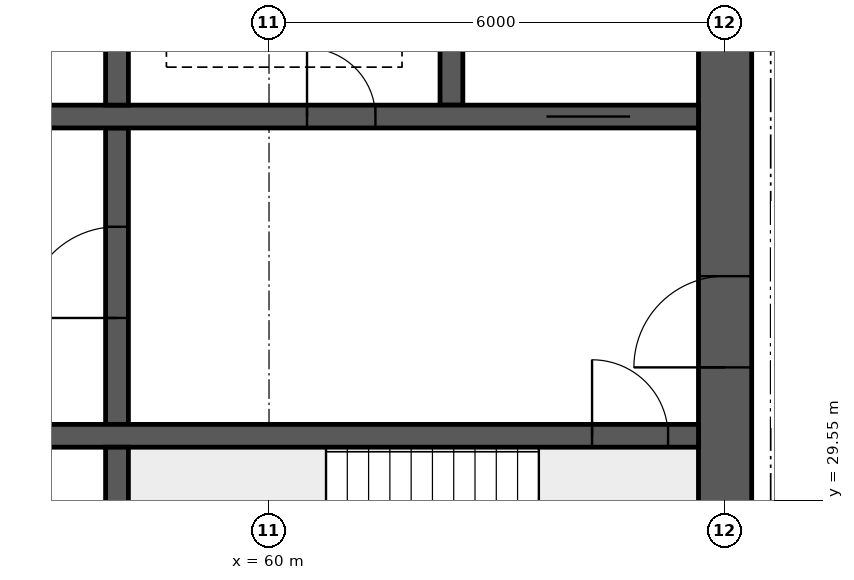
"""IFC4 building model, lengths in metres.
Left out: names, types, materials, properties, quantities, classifications, styles, units other than length and angle.
Written with IfcOpenShell. Run it as: python <this file> out.ifc"""

import sys

from ifc_helpers import new_model, si_unit, direction, frame, frame_2d, origin, place, context, subcontext, project, spatial, rectangle, extrude, element, fill, save


model = new_model("IFC4")
c1 = context("Model", 3, precision=1e-05, world=origin(), true_north=direction((0.0, 1.0)))
c2 = subcontext(c1, "Body", "Model", "MODEL_VIEW")
j1 = project(units=[si_unit("LENGTHUNIT", "METRE"), si_unit("PLANEANGLEUNIT", "RADIAN")], contexts=[c1])
p1 = place(None, origin())
s1 = spatial("IfcSite", under=j1, at=p1, CompositionType="ELEMENT")
p2 = place(p1, origin())
s2 = spatial("IfcBuilding", under=s1, at=p2, CompositionType="ELEMENT")
p3 = place(p2, frame((0.0, 0.0, 235.3)))
s3 = spatial("IfcBuildingStorey", under=s2, at=p3, CompositionType="ELEMENT", Elevation=235.3)
p4 = place(p3, frame((66.0, 26.15, 0.0), z_axis=(0.0, 0.0, 1.0), x_axis=(0.0, 1.0, 0.0)))
e1 = element("IfcWall", 1, at=p4, inside=s3, PredefinedType="SHEAR", context=c2, shape_type="SweptSolid", body=[
    extrude(rectangle(XDim=11.7, YDim=0.7, at=frame_2d((5.85, 0.0))), origin(), (0.0, 0.0, 1.0), 3.75),
])
p5 = place(p4, frame((5.15, 0.0, 0.0)))
e2 = element("IfcOpeningElement", 2, at=p5, cuts=e1, PredefinedType="OPENING", context=c2, shape_type="SweptSolid", body=[
    extrude(rectangle(XDim=1.2, YDim=2.1, at=frame_2d((0.6, 1.05))), frame((0.0, 0.36, 0.0), z_axis=(0.0, -1.0, 0.0), x_axis=(1.0, 0.0, 0.0)), (0.0, 0.0, 1.0), 0.72),
])
p6 = place(p3, frame((18.35, 30.4, 0.0), z_axis=(0.0, 0.0, 1.0), x_axis=(1.0, 0.0, 0.0)))
e3 = element("IfcWall", 3, at=p6, inside=s3, PredefinedType="SHEAR", context=c2, shape_type="SweptSolid", body=[
    extrude(rectangle(XDim=47.3, YDim=0.3, at=frame_2d((23.65, 0.0))), origin(), (0.0, 0.0, 1.0), 3.75),
])
p7 = place(p6, frame((0.4, 0.0, 0.0)))
e4 = element("IfcOpeningElement", 4, at=p7, cuts=e3, PredefinedType="OPENING", context=c2, shape_type="SweptSolid", body=[
    extrude(rectangle(XDim=1.0, YDim=2.1, at=frame_2d((0.5, 1.05))), frame((0.0, 0.16, 0.0), z_axis=(0.0, -1.0, 0.0), x_axis=(1.0, 0.0, 0.0)), (0.0, 0.0, 1.0), 0.32),
])
p8 = place(p6, frame((45.9, 0.0, 0.0)))
e5 = element("IfcOpeningElement", 5, at=p8, cuts=e3, PredefinedType="OPENING", context=c2, shape_type="SweptSolid", body=[
    extrude(rectangle(XDim=1.0, YDim=2.1, at=frame_2d((0.5, 1.05))), frame((0.0, 0.16, 0.0), z_axis=(0.0, -1.0, 0.0), x_axis=(1.0, 0.0, 0.0)), (0.0, 0.0, 1.0), 0.32),
])
p9 = place(p6, frame((8.4, 0.0, 0.0)))
e6 = element("IfcOpeningElement", 6, at=p9, cuts=e3, PredefinedType="OPENING", context=c2, shape_type="SweptSolid", body=[
    extrude(rectangle(XDim=1.1, YDim=2.1, at=frame_2d((0.55, 1.05))), frame((0.0, 0.16, 0.0), z_axis=(0.0, -1.0, 0.0), x_axis=(1.0, 0.0, 0.0)), (0.0, 0.0, 1.0), 0.32),
])
p10 = place(p6, frame((11.0, 0.0, 0.0)))
e7 = element("IfcOpeningElement", 7, at=p10, cuts=e3, PredefinedType="OPENING", context=c2, shape_type="SweptSolid", body=[
    extrude(rectangle(XDim=1.1, YDim=2.1, at=frame_2d((0.55, 1.05))), frame((0.0, 0.16, 0.0), z_axis=(0.0, -1.0, 0.0), x_axis=(1.0, 0.0, 0.0)), (0.0, 0.0, 1.0), 0.32),
])
p11 = place(p6, frame((13.6, 0.0, 0.0)))
e8 = element("IfcOpeningElement", 8, at=p11, cuts=e3, PredefinedType="OPENING", context=c2, shape_type="SweptSolid", body=[
    extrude(rectangle(XDim=1.1, YDim=2.1, at=frame_2d((0.55, 1.05))), frame((0.0, 0.16, 0.0), z_axis=(0.0, -1.0, 0.0), x_axis=(1.0, 0.0, 0.0)), (0.0, 0.0, 1.0), 0.32),
])
p12 = place(p6, frame((16.2, 0.0, 0.0)))
e9 = element("IfcOpeningElement", 9, at=p12, cuts=e3, PredefinedType="OPENING", context=c2, shape_type="SweptSolid", body=[
    extrude(rectangle(XDim=1.1, YDim=2.1, at=frame_2d((0.55, 1.05))), frame((0.0, 0.16, 0.0), z_axis=(0.0, -1.0, 0.0), x_axis=(1.0, 0.0, 0.0)), (0.0, 0.0, 1.0), 0.32),
])
p13 = place(p6, frame((18.975, 0.0, 0.0)))
e10 = element("IfcOpeningElement", 10, at=p13, cuts=e3, PredefinedType="OPENING", context=c2, shape_type="SweptSolid", body=[
    extrude(rectangle(XDim=0.9, YDim=2.1, at=frame_2d((0.45, 1.05))), frame((0.0, 0.16, 0.0), z_axis=(0.0, -1.0, 0.0), x_axis=(1.0, 0.0, 0.0)), (0.0, 0.0, 1.0), 0.32),
])
p14 = place(p6, frame((24.475, 0.0, 0.0)))
e11 = element("IfcOpeningElement", 11, at=p14, cuts=e3, PredefinedType="OPENING", context=c2, shape_type="SweptSolid", body=[
    extrude(rectangle(XDim=0.9, YDim=2.1, at=frame_2d((0.45, 1.05))), frame((0.0, 0.16, 0.0), z_axis=(0.0, -1.0, 0.0), x_axis=(1.0, 0.0, 0.0)), (0.0, 0.0, 1.0), 0.32),
])
p15 = place(p6, frame((30.267, 0.0, 0.0)))
e12 = element("IfcOpeningElement", 12, at=p15, cuts=e3, PredefinedType="OPENING", context=c2, shape_type="SweptSolid", body=[
    extrude(rectangle(XDim=1.1, YDim=2.1, at=frame_2d((0.55, 1.05))), frame((0.0, 0.16, 0.0), z_axis=(0.0, -1.0, 0.0), x_axis=(1.0, 0.0, 0.0)), (0.0, 0.0, 1.0), 0.32),
])
p16 = place(p6, frame((33.8, 0.0, 0.0)))
e13 = element("IfcOpeningElement", 13, at=p16, cuts=e3, PredefinedType="OPENING", context=c2, shape_type="SweptSolid", body=[
    extrude(rectangle(XDim=1.1, YDim=2.1, at=frame_2d((0.55, 1.05))), frame((0.0, 0.16, 0.0), z_axis=(0.0, -1.0, 0.0), x_axis=(1.0, 0.0, 0.0)), (0.0, 0.0, 1.0), 0.32),
])
p17 = place(p6, frame((37.333, 0.0, 0.0)))
e14 = element("IfcOpeningElement", 14, at=p17, cuts=e3, PredefinedType="OPENING", context=c2, shape_type="SweptSolid", body=[
    extrude(rectangle(XDim=1.1, YDim=2.1, at=frame_2d((0.55, 1.05))), frame((0.0, 0.16, 0.0), z_axis=(0.0, -1.0, 0.0), x_axis=(1.0, 0.0, 0.0)), (0.0, 0.0, 1.0), 0.32),
])
p18 = place(p3, frame((18.35, 34.6, 0.0), z_axis=(0.0, 0.0, 1.0), x_axis=(1.0, 0.0, 0.0)))
e15 = element("IfcWall", 15, at=p18, inside=s3, PredefinedType="SHEAR", context=c2, shape_type="SweptSolid", body=[
    extrude(rectangle(XDim=47.3, YDim=0.3, at=frame_2d((23.65, 0.0))), origin(), (0.0, 0.0, 1.0), 3.75),
])
p19 = place(p18, frame((0.9, 0.0, 0.0)))
e16 = element("IfcOpeningElement", 16, at=p19, cuts=e15, PredefinedType="OPENING", context=c2, shape_type="SweptSolid", body=[
    extrude(rectangle(XDim=1.1, YDim=2.1, at=frame_2d((0.55, 1.05))), frame((0.0, 0.16, 0.0), z_axis=(0.0, -1.0, 0.0), x_axis=(1.0, 0.0, 0.0)), (0.0, 0.0, 1.0), 0.32),
])
p20 = place(p18, frame((45.3, 0.0, 0.0)))
e17 = element("IfcOpeningElement", 17, at=p20, cuts=e15, PredefinedType="OPENING", context=c2, shape_type="SweptSolid", body=[
    extrude(rectangle(XDim=1.1, YDim=2.1, at=frame_2d((0.55, 1.05))), frame((0.0, 0.16, 0.0), z_axis=(0.0, -1.0, 0.0), x_axis=(1.0, 0.0, 0.0)), (0.0, 0.0, 1.0), 0.32),
])
p21 = place(p18, frame((4.25, 0.0, 0.0)))
e18 = element("IfcOpeningElement", 18, at=p21, cuts=e15, PredefinedType="OPENING", context=c2, shape_type="SweptSolid", body=[
    extrude(rectangle(XDim=0.9, YDim=2.1, at=frame_2d((0.45, 1.05))), frame((0.0, 0.16, 0.0), z_axis=(0.0, -1.0, 0.0), x_axis=(1.0, 0.0, 0.0)), (0.0, 0.0, 1.0), 0.32),
])
p22 = place(p18, frame((42.15, 0.0, 0.0)))
e19 = element("IfcOpeningElement", 19, at=p22, cuts=e15, PredefinedType="OPENING", context=c2, shape_type="SweptSolid", body=[
    extrude(rectangle(XDim=0.9, YDim=2.1, at=frame_2d((0.45, 1.05))), frame((0.0, 0.16, 0.0), z_axis=(0.0, -1.0, 0.0), x_axis=(1.0, 0.0, 0.0)), (0.0, 0.0, 1.0), 0.32),
])
p23 = place(p18, frame((9.025, 0.0, 0.0)))
e20 = element("IfcOpeningElement", 20, at=p23, cuts=e15, PredefinedType="OPENING", context=c2, shape_type="SweptSolid", body=[
    extrude(rectangle(XDim=0.9, YDim=2.1, at=frame_2d((0.45, 1.05))), frame((0.0, 0.16, 0.0), z_axis=(0.0, -1.0, 0.0), x_axis=(1.0, 0.0, 0.0)), (0.0, 0.0, 1.0), 0.32),
])
p24 = place(p18, frame((12.999, 0.0, 0.0)))
e21 = element("IfcOpeningElement", 21, at=p24, cuts=e15, PredefinedType="OPENING", context=c2, shape_type="SweptSolid", body=[
    extrude(rectangle(XDim=0.9, YDim=2.1, at=frame_2d((0.45, 1.05))), frame((0.0, 0.16, 0.0), z_axis=(0.0, -1.0, 0.0), x_axis=(1.0, 0.0, 0.0)), (0.0, 0.0, 1.0), 0.32),
])
p25 = place(p18, frame((16.646, 0.0, 0.0)))
e22 = element("IfcOpeningElement", 22, at=p25, cuts=e15, PredefinedType="OPENING", context=c2, shape_type="SweptSolid", body=[
    extrude(rectangle(XDim=0.9, YDim=2.1, at=frame_2d((0.45, 1.05))), frame((0.0, 0.16, 0.0), z_axis=(0.0, -1.0, 0.0), x_axis=(1.0, 0.0, 0.0)), (0.0, 0.0, 1.0), 0.32),
])
p26 = place(p18, frame((20.405, 0.0, 0.0)))
e23 = element("IfcOpeningElement", 23, at=p26, cuts=e15, PredefinedType="OPENING", context=c2, shape_type="SweptSolid", body=[
    extrude(rectangle(XDim=0.9, YDim=2.1, at=frame_2d((0.45, 1.05))), frame((0.0, 0.16, 0.0), z_axis=(0.0, -1.0, 0.0), x_axis=(1.0, 0.0, 0.0)), (0.0, 0.0, 1.0), 0.32),
])
p27 = place(p18, frame((24.811, 0.0, 0.0)))
e24 = element("IfcOpeningElement", 24, at=p27, cuts=e15, PredefinedType="OPENING", context=c2, shape_type="SweptSolid", body=[
    extrude(rectangle(XDim=0.9, YDim=2.1, at=frame_2d((0.45, 1.05))), frame((0.0, 0.16, 0.0), z_axis=(0.0, -1.0, 0.0), x_axis=(1.0, 0.0, 0.0)), (0.0, 0.0, 1.0), 0.32),
])
p28 = place(p18, frame((27.608, 0.0, 0.0)))
e25 = element("IfcOpeningElement", 25, at=p28, cuts=e15, PredefinedType="OPENING", context=c2, shape_type="SweptSolid", body=[
    extrude(rectangle(XDim=0.9, YDim=2.1, at=frame_2d((0.45, 1.05))), frame((0.0, 0.16, 0.0), z_axis=(0.0, -1.0, 0.0), x_axis=(1.0, 0.0, 0.0)), (0.0, 0.0, 1.0), 0.32),
])
p29 = place(p18, frame((30.791, 0.0, 0.0)))
e26 = element("IfcOpeningElement", 26, at=p29, cuts=e15, PredefinedType="OPENING", context=c2, shape_type="SweptSolid", body=[
    extrude(rectangle(XDim=0.9, YDim=2.1, at=frame_2d((0.45, 1.05))), frame((0.0, 0.16, 0.0), z_axis=(0.0, -1.0, 0.0), x_axis=(1.0, 0.0, 0.0)), (0.0, 0.0, 1.0), 0.32),
])
p30 = place(p18, frame((34.742, 0.0, 0.0)))
e27 = element("IfcOpeningElement", 27, at=p30, cuts=e15, PredefinedType="OPENING", context=c2, shape_type="SweptSolid", body=[
    extrude(rectangle(XDim=0.9, YDim=2.1, at=frame_2d((0.45, 1.05))), frame((0.0, 0.16, 0.0), z_axis=(0.0, -1.0, 0.0), x_axis=(1.0, 0.0, 0.0)), (0.0, 0.0, 1.0), 0.32),
])
p31 = place(p18, frame((37.68, 0.0, 0.0)))
e28 = element("IfcOpeningElement", 28, at=p31, cuts=e15, PredefinedType="OPENING", context=c2, shape_type="SweptSolid", body=[
    extrude(rectangle(XDim=0.9, YDim=2.1, at=frame_2d((0.45, 1.05))), frame((0.0, 0.16, 0.0), z_axis=(0.0, -1.0, 0.0), x_axis=(1.0, 0.0, 0.0)), (0.0, 0.0, 1.0), 0.32),
])
p32 = place(p3, frame((58.0, 26.15, 0.0), z_axis=(0.0, 0.0, 1.0), x_axis=(0.0, 1.0, 0.0)))
e29 = element("IfcWall", 29, at=p32, inside=s3, PredefinedType="SHEAR", context=c2, shape_type="SweptSolid", body=[
    extrude(rectangle(XDim=4.1, YDim=0.3, at=frame_2d((2.05, 0.0))), origin(), (0.0, 0.0, 1.0), 3.75),
])
p33 = place(p3, frame((58.0, 30.55, 0.0), z_axis=(0.0, 0.0, 1.0), x_axis=(0.0, 1.0, 0.0)))
e30 = element("IfcWall", 30, at=p33, inside=s3, PredefinedType="SHEAR", context=c2, shape_type="SweptSolid", body=[
    extrude(rectangle(XDim=3.9, YDim=0.3, at=frame_2d((1.95, 0.0))), origin(), (0.0, 0.0, 1.0), 3.75),
])
p34 = place(p33, frame((1.4, 0.0, 0.0)))
e31 = element("IfcOpeningElement", 31, at=p34, cuts=e30, PredefinedType="OPENING", context=c2, shape_type="SweptSolid", body=[
    extrude(rectangle(XDim=1.2, YDim=2.1, at=frame_2d((0.6, 1.05))), frame((0.0, 0.16, 0.0), z_axis=(0.0, -1.0, 0.0), x_axis=(1.0, 0.0, 0.0)), (0.0, 0.0, 1.0), 0.32),
])
for number, where, z_axis, x_axis in (
    (32, (62.4, 34.75, 0.0), (0.0, 0.0, 1.0), (0.0, 1.0, 0.0)),
    (33, (58.0, 34.75, 0.0), (0.0, 0.0, 1.0), (0.0, 1.0, 0.0)),
):
    element("IfcWall", number, at=place(p3, frame(where, z_axis=z_axis, x_axis=x_axis)), inside=s3, PredefinedType="SHEAR", context=c2, shape_type="SweptSolid", body=[
        extrude(rectangle(XDim=3.1, YDim=0.3, at=frame_2d((1.55, 0.0))), origin(), (0.0, 0.0, 1.0), 3.75),
    ])
p35 = place(p5, origin())
e34 = element("IfcDoor", 34, at=p35, inside=s3, OperationType="SINGLE_SWING_LEFT", PredefinedType="DOOR", context=c2, shape_type="SweptSolid", body=[
    extrude(rectangle(XDim=1.2, YDim=2.1, at=frame_2d((0.6, 1.05))), frame((0.0, 0.025, 0.0), z_axis=(0.0, -1.0, 0.0), x_axis=(1.0, 0.0, 0.0)), (0.0, 0.0, 1.0), 0.05),
])
fill(e2, e34)
p36 = place(p8, origin())
e35 = element("IfcDoor", 35, at=p36, inside=s3, OperationType="SINGLE_SWING_LEFT", PredefinedType="DOOR", context=c2, shape_type="SweptSolid", body=[
    extrude(rectangle(XDim=1.0, YDim=2.1, at=frame_2d((0.5, 1.05))), frame((0.0, 0.025, 0.0), z_axis=(0.0, -1.0, 0.0), x_axis=(1.0, 0.0, 0.0)), (0.0, 0.0, 1.0), 0.05),
])
fill(e5, e35)
p37 = place(p20, origin())
e36 = element("IfcDoor", 36, at=p37, inside=s3, OperationType="DOUBLE_DOOR_SLIDING", PredefinedType="DOOR", context=c2, shape_type="SweptSolid", body=[
    extrude(rectangle(XDim=1.1, YDim=2.1, at=frame_2d((0.55, 1.05))), frame((0.0, 0.025, 0.0), z_axis=(0.0, -1.0, 0.0), x_axis=(1.0, 0.0, 0.0)), (0.0, 0.0, 1.0), 0.05),
])
fill(e17, e36)
p38 = place(p22, origin())
e37 = element("IfcDoor", 37, at=p38, inside=s3, OperationType="SINGLE_SWING_LEFT", PredefinedType="DOOR", context=c2, shape_type="SweptSolid", body=[
    extrude(rectangle(XDim=0.9, YDim=2.1, at=frame_2d((0.45, 1.05))), frame((0.0, 0.025, 0.0), z_axis=(0.0, -1.0, 0.0), x_axis=(1.0, 0.0, 0.0)), (0.0, 0.0, 1.0), 0.05),
])
fill(e19, e37)
p39 = place(p34, origin())
e38 = element("IfcDoor", 38, at=p39, inside=s3, OperationType="SINGLE_SWING_LEFT", PredefinedType="DOOR", context=c2, shape_type="SweptSolid", body=[
    extrude(rectangle(XDim=1.2, YDim=2.1, at=frame_2d((0.6, 1.05))), frame((0.0, 0.025, 0.0), z_axis=(0.0, -1.0, 0.0), x_axis=(1.0, 0.0, 0.0)), (0.0, 0.0, 1.0), 0.05),
])
fill(e31, e38)
save(model, sys.argv[1])
